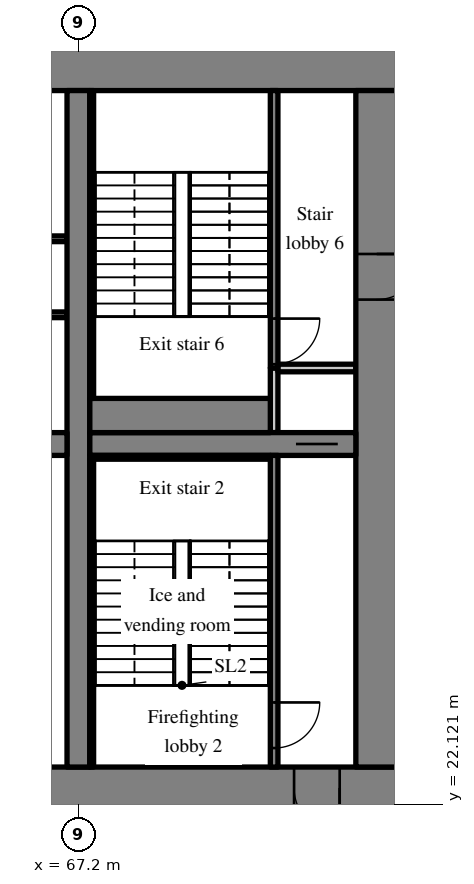
"""IFC4 building model, lengths in metres.
Left out: names, types, materials, properties, quantities, classifications, styles, units other than length and angle.
Written with IfcOpenShell. Run it as: python <this file> out.ifc"""

import sys

from ifc_helpers import new_model, si_unit, direction, frame, frame_2d, origin, place, context, subcontext, project, spatial, rectangle, extrude, source, transform, mapped, element, fill, save


model = new_model("IFC4")
c1 = context("Model", 3, precision=1e-05, world=origin(), true_north=direction((0.0, 1.0)))
c2 = subcontext(c1, "Body", "Model", "MODEL_VIEW")
j1 = project(units=[si_unit("LENGTHUNIT", "METRE"), si_unit("PLANEANGLEUNIT", "RADIAN")], contexts=[c1])
p1 = place(None, origin())
s1 = spatial("IfcSite", under=j1, at=p1, CompositionType="ELEMENT")
p2 = place(p1, origin())
s2 = spatial("IfcBuilding", under=s1, at=p2, CompositionType="ELEMENT")
p3 = place(p2, frame((0.0, 0.0, 18.0)))
s3 = spatial("IfcBuildingStorey", under=s2, at=p3, CompositionType="ELEMENT", Elevation=18.0)
m1 = source(origin(), c2, "Body", "SweptSolid", [
    extrude(rectangle(XDim=50.4, YDim=1.1, at=frame_2d((25.2, 0.0))), origin(), (0.0, 0.0, 1.0), 4.72),
])
p4 = place(p3, frame((25.2, 22.55, 0.0), z_axis=(0.0, 0.0, 1.0), x_axis=(1.0, 0.0, 0.0)))
e1 = element("IfcWall", 1, at=p4, inside=s3, PredefinedType="SHEAR", context=c2, shape_type="MappedRepresentation", body=[
    mapped(m1, transform((0.0, 0.0, 0.0), scale=1.0)),
])
m2 = source(origin(), c2, "Body", "SweptSolid", [
    extrude(rectangle(XDim=1.8, YDim=2.1, at=frame_2d((0.9, 1.05))), frame((0.0, 0.56, 0.0), z_axis=(0.0, -1.0, 0.0), x_axis=(1.0, 0.0, 0.0)), (0.0, 0.0, 1.0), 1.12),
])
p5 = place(p4, frame((15.9, 0.0, 0.0)))
e2 = element("IfcOpeningElement", 2, at=p5, cuts=e1, PredefinedType="OPENING", context=c2, shape_type="MappedRepresentation", body=[
    mapped(m2, transform((0.0, 0.0, 0.0), scale=1.0)),
])
m3 = source(origin(), c2, "Body", "SweptSolid", [
    extrude(rectangle(XDim=1.2, YDim=2.1, at=frame_2d((0.6, 1.05))), frame((0.0, 0.56, 0.0), z_axis=(0.0, -1.0, 0.0), x_axis=(1.0, 0.0, 0.0)), (0.0, 0.0, 1.0), 1.12),
])
p6 = place(p4, frame((27.0, 0.0, 0.0)))
e3 = element("IfcOpeningElement", 3, at=p6, cuts=e1, PredefinedType="OPENING", context=c2, shape_type="MappedRepresentation", body=[
    mapped(m3, transform((0.0, 0.0, 0.0), scale=1.0)),
])
m4 = source(origin(), c2, "Body", "SweptSolid", [
    extrude(rectangle(XDim=0.9, YDim=2.1, at=frame_2d((0.45, 1.05))), frame((0.0, 0.56, 0.0), z_axis=(0.0, -1.0, 0.0), x_axis=(1.0, 0.0, 0.0)), (0.0, 0.0, 1.0), 1.12),
])
p7 = place(p4, frame((34.5, 0.0, 0.0)))
e4 = element("IfcOpeningElement", 4, at=p7, cuts=e1, PredefinedType="OPENING", context=c2, shape_type="MappedRepresentation", body=[
    mapped(m4, transform((0.0, 0.0, 0.0), scale=1.0)),
])
p8 = place(p4, frame((31.5, 0.0, 0.0)))
e5 = element("IfcOpeningElement", 5, at=p8, cuts=e1, PredefinedType="OPENING", context=c2, shape_type="MappedRepresentation", body=[
    mapped(m4, transform((0.0, 0.0, 0.0), scale=1.0)),
])
p9 = place(p4, frame((39.75, 0.0, 0.0)))
e6 = element("IfcOpeningElement", 6, at=p9, cuts=e1, PredefinedType="OPENING", context=c2, shape_type="MappedRepresentation", body=[
    mapped(m4, transform((0.0, 0.0, 0.0), scale=1.0)),
])
p10 = place(p4, frame((36.75, 0.0, 0.0)))
e7 = element("IfcOpeningElement", 7, at=p10, cuts=e1, PredefinedType="OPENING", context=c2, shape_type="MappedRepresentation", body=[
    mapped(m4, transform((0.0, 0.0, 0.0), scale=1.0)),
])
p11 = place(p4, frame((6.425, 0.0, 0.0)))
e8 = element("IfcOpeningElement", 8, at=p11, cuts=e1, PredefinedType="OPENING", context=c2, shape_type="MappedRepresentation", body=[
    mapped(m3, transform((0.0, 0.0, 0.0), scale=1.0)),
])
p12 = place(p4, frame((47.675, 0.0, 0.0)))
e9 = element("IfcOpeningElement", 9, at=p12, cuts=e1, PredefinedType="OPENING", context=c2, shape_type="MappedRepresentation", body=[
    mapped(m3, transform((0.0, 0.0, 0.0), scale=1.0)),
])
p13 = place(p3, frame((25.2, 41.45, 0.0), z_axis=(0.0, 0.0, 1.0), x_axis=(1.0, 0.0, 0.0)))
e10 = element("IfcWall", 10, at=p13, inside=s3, PredefinedType="SHEAR", context=c2, shape_type="MappedRepresentation", body=[
    mapped(m1, transform((0.0, 0.0, 0.0), scale=1.0)),
])
m5 = source(origin(), c2, "Body", "SweptSolid", [
    extrude(rectangle(XDim=17.8, YDim=1.1, at=frame_2d((8.9, 0.0))), origin(), (0.0, 0.0, 1.0), 4.72),
])
p14 = place(p3, frame((75.05, 23.1, 0.0), z_axis=(0.0, 0.0, 1.0), x_axis=(0.0, 1.0, 0.0)))
e11 = element("IfcWall", 11, at=p14, inside=s3, PredefinedType="SHEAR", context=c2, shape_type="MappedRepresentation", body=[
    mapped(m5, transform((0.0, 0.0, 0.0), scale=1.0)),
])
p15 = place(p14, frame((12.3, 0.0, 0.0)))
e12 = element("IfcOpeningElement", 12, at=p15, cuts=e11, PredefinedType="OPENING", context=c2, shape_type="MappedRepresentation", body=[
    mapped(m3, transform((0.0, 0.0, 0.0), scale=1.0)),
])
m6 = source(origin(), c2, "Body", "SweptSolid", [
    extrude(rectangle(XDim=17.8, YDim=0.6, at=frame_2d((8.9, 0.0))), origin(), (0.0, 0.0, 1.0), 4.72),
])
p16 = place(p3, frame((67.2, 23.1, 0.0), z_axis=(0.0, 0.0, 1.0), x_axis=(0.0, 1.0, 0.0)))
e13 = element("IfcWall", 13, at=p16, inside=s3, PredefinedType="SHEAR", context=c2, shape_type="MappedRepresentation", body=[
    mapped(m6, transform((0.0, 0.0, 0.0), scale=1.0)),
])
m7 = source(origin(), c2, "Body", "SweptSolid", [
    extrude(rectangle(XDim=16.2, YDim=0.6, at=frame_2d((8.1, 0.0))), origin(), (0.0, 0.0, 1.0), 4.72),
])
p17 = place(p3, frame((50.7, 31.6, 0.0), z_axis=(0.0, 0.0, 1.0), x_axis=(1.0, 0.0, 0.0)))
e14 = element("IfcWall", 14, at=p17, inside=s3, PredefinedType="SHEAR", context=c2, shape_type="MappedRepresentation", body=[
    mapped(m7, transform((0.0, 0.0, 0.0), scale=1.0)),
])
m8 = source(origin(), c2, "Body", "SweptSolid", [
    extrude(rectangle(XDim=1.0, YDim=2.1, at=frame_2d((0.5, 1.05))), frame((0.0, 0.31, 0.0), z_axis=(0.0, -1.0, 0.0), x_axis=(1.0, 0.0, 0.0)), (0.0, 0.0, 1.0), 0.62),
])
p18 = place(p17, frame((0.55, 0.0, 0.0)))
e15 = element("IfcOpeningElement", 15, at=p18, cuts=e14, PredefinedType="OPENING", context=c2, shape_type="MappedRepresentation", body=[
    mapped(m8, transform((0.0, 0.0, 0.0), scale=1.0)),
])
m9 = source(origin(), c2, "Body", "SweptSolid", [
    extrude(rectangle(XDim=7.0, YDim=0.6, at=frame_2d((3.5, 0.0))), origin(), (0.0, 0.0, 1.0), 4.72),
])
p19 = place(p3, frame((67.5, 31.6, 0.0), z_axis=(0.0, 0.0, 1.0), x_axis=(1.0, 0.0, 0.0)))
e16 = element("IfcWall", 16, at=p19, inside=s3, PredefinedType="SHEAR", context=c2, shape_type="MappedRepresentation", body=[
    mapped(m9, transform((0.0, 0.0, 0.0), scale=1.0)),
])
m10 = source(origin(), c2, "Body", "SweptSolid", [
    extrude(rectangle(XDim=1.1, YDim=2.1, at=frame_2d((0.55, 1.05))), frame((0.0, 0.31, 0.0), z_axis=(0.0, -1.0, 0.0), x_axis=(1.0, 0.0, 0.0)), (0.0, 0.0, 1.0), 0.62),
])
p20 = place(p19, frame((5.425, 0.0, 0.0)))
e17 = element("IfcOpeningElement", 17, at=p20, cuts=e16, PredefinedType="OPENING", context=c2, shape_type="MappedRepresentation", body=[
    mapped(m10, transform((0.0, 0.0, 0.0), scale=1.0)),
])
m11 = source(origin(), c2, "Body", "SweptSolid", [
    extrude(rectangle(XDim=14.1, YDim=0.15, at=frame_2d((7.05, 0.0))), origin(), (0.0, 0.0, 1.0), 4.72),
])
p21 = place(p3, frame((66.9, 35.0, 0.0), z_axis=(0.0, 0.0, 1.0), x_axis=(-1.0, 0.0, 0.0)))
e18 = element("IfcWall", 18, at=p21, inside=s3, PredefinedType="PARTITIONING", context=c2, shape_type="MappedRepresentation", body=[
    mapped(m11, transform((0.0, 0.0, 0.0), scale=1.0)),
])
m12 = source(origin(), c2, "Body", "SweptSolid", [
    extrude(rectangle(XDim=0.9, YDim=2.1, at=frame_2d((0.45, 1.05))), frame((0.0, 0.085, 0.0), z_axis=(0.0, -1.0, 0.0), x_axis=(1.0, 0.0, 0.0)), (0.0, 0.0, 1.0), 0.17),
])
p22 = place(p21, frame((0.952, 0.0, 0.0)))
e19 = element("IfcOpeningElement", 19, at=p22, cuts=e18, PredefinedType="OPENING", context=c2, shape_type="MappedRepresentation", body=[
    mapped(m12, transform((0.0, 0.0, 0.0), scale=1.0)),
])
p23 = place(p21, frame((5.861, 0.0, 0.0)))
e20 = element("IfcOpeningElement", 20, at=p23, cuts=e18, PredefinedType="OPENING", context=c2, shape_type="MappedRepresentation", body=[
    mapped(m12, transform((0.0, 0.0, 0.0), scale=1.0)),
])
p24 = place(p21, frame((11.471, 0.0, 0.0)))
e21 = element("IfcOpeningElement", 21, at=p24, cuts=e18, PredefinedType="OPENING", context=c2, shape_type="MappedRepresentation", body=[
    mapped(m12, transform((0.0, 0.0, 0.0), scale=1.0)),
])
m13 = source(origin(), c2, "Body", "SweptSolid", [
    extrude(rectangle(XDim=16.2, YDim=0.15, at=frame_2d((8.1, 0.0))), origin(), (0.0, 0.0, 1.0), 4.72),
])
p25 = place(p3, frame((66.9, 37.0, 0.0), z_axis=(0.0, 0.0, 1.0), x_axis=(-1.0, 0.0, 0.0)))
e22 = element("IfcWall", 22, at=p25, inside=s3, PredefinedType="PARTITIONING", context=c2, shape_type="MappedRepresentation", body=[
    mapped(m13, transform((0.0, 0.0, 0.0), scale=1.0)),
])
p26 = place(p25, frame((0.765, 0.0, 0.0)))
e23 = element("IfcOpeningElement", 23, at=p26, cuts=e22, PredefinedType="OPENING", context=c2, shape_type="MappedRepresentation", body=[
    mapped(m12, transform((0.0, 0.0, 0.0), scale=1.0)),
])
p27 = place(p25, frame((3.6, 0.0, 0.0)))
e24 = element("IfcOpeningElement", 24, at=p27, cuts=e22, PredefinedType="OPENING", context=c2, shape_type="MappedRepresentation", body=[
    mapped(m12, transform((0.0, 0.0, 0.0), scale=1.0)),
])
p28 = place(p25, frame((9.27, 0.0, 0.0)))
e25 = element("IfcOpeningElement", 25, at=p28, cuts=e22, PredefinedType="OPENING", context=c2, shape_type="MappedRepresentation", body=[
    mapped(m12, transform((0.0, 0.0, 0.0), scale=1.0)),
])
p29 = place(p25, frame((14.535, 0.0, 0.0)))
e26 = element("IfcOpeningElement", 26, at=p29, cuts=e22, PredefinedType="OPENING", context=c2, shape_type="MappedRepresentation", body=[
    mapped(m12, transform((0.0, 0.0, 0.0), scale=1.0)),
])
m14 = source(origin(), c2, "Body", "SweptSolid", [
    extrude(rectangle(XDim=8.2, YDim=0.2, at=frame_2d((4.1, 0.0))), origin(), (0.0, 0.0, 1.0), 4.72),
])
p30 = place(p3, frame((72.35, 23.1, 0.0), z_axis=(0.0, 0.0, 1.0), x_axis=(0.0, 1.0, 0.0)))
e27 = element("IfcWall", 27, at=p30, inside=s3, PredefinedType="SOLIDWALL", context=c2, shape_type="MappedRepresentation", body=[
    mapped(m14, transform((0.0, 0.0, 0.0), scale=1.0)),
])
m15 = source(origin(), c2, "Body", "SweptSolid", [
    extrude(rectangle(XDim=1.2, YDim=2.1, at=frame_2d((0.6, 1.05))), frame((0.0, 0.11, 0.0), z_axis=(0.0, -1.0, 0.0), x_axis=(1.0, 0.0, 0.0)), (0.0, 0.0, 1.0), 0.22),
])
p31 = place(p30, frame((0.5, 0.0, 0.0)))
e28 = element("IfcOpeningElement", 28, at=p31, cuts=e27, PredefinedType="OPENING", context=c2, shape_type="MappedRepresentation", body=[
    mapped(m15, transform((0.0, 0.0, 0.0), scale=1.0)),
])
m16 = source(origin(), c2, "Body", "SweptSolid", [
    extrude(rectangle(XDim=1.7, YDim=0.2, at=frame_2d((0.85, 0.0))), origin(), (0.0, 0.0, 1.0), 4.72),
])
p32 = place(p3, frame((72.35, 31.9, 0.0), z_axis=(0.0, 0.0, 1.0), x_axis=(0.0, 1.0, 0.0)))
e29 = element("IfcWall", 29, at=p32, inside=s3, PredefinedType="SOLIDWALL", context=c2, shape_type="MappedRepresentation", body=[
    mapped(m16, transform((0.0, 0.0, 0.0), scale=1.0)),
])
m17 = source(origin(), c2, "Body", "SweptSolid", [
    extrude(rectangle(XDim=2.05, YDim=0.2, at=frame_2d((1.025, 0.0))), origin(), (0.0, 0.0, 1.0), 4.72),
])
p33 = place(p3, frame((72.45, 33.6, 0.0), z_axis=(0.0, 0.0, 1.0), x_axis=(1.0, 0.0, 0.0)))
e30 = element("IfcWall", 30, at=p33, inside=s3, PredefinedType="SOLIDWALL", context=c2, shape_type="MappedRepresentation", body=[
    mapped(m17, transform((0.0, 0.0, 0.0), scale=1.0)),
])
m18 = source(origin(), c2, "Body", "SweptSolid", [
    extrude(rectangle(XDim=7.3, YDim=0.2, at=frame_2d((3.65, 0.0))), origin(), (0.0, 0.0, 1.0), 4.72),
])
p34 = place(p3, frame((72.35, 33.6, 0.0), z_axis=(0.0, 0.0, 1.0), x_axis=(0.0, 1.0, 0.0)))
e31 = element("IfcWall", 31, at=p34, inside=s3, PredefinedType="SOLIDWALL", context=c2, shape_type="MappedRepresentation", body=[
    mapped(m18, transform((0.0, 0.0, 0.0), scale=1.0)),
])
p35 = place(p34, frame((0.1, 0.0, 0.0)))
e32 = element("IfcOpeningElement", 32, at=p35, cuts=e31, PredefinedType="OPENING", context=c2, shape_type="MappedRepresentation", body=[
    mapped(m15, transform((0.0, 0.0, 0.0), scale=1.0)),
])
m19 = source(origin(), c2, "Body", "SweptSolid", [
    extrude(rectangle(XDim=4.75, YDim=0.1, at=frame_2d((2.375, 0.0))), origin(), (0.0, 0.0, 1.0), 4.72),
])
p36 = place(p3, frame((67.5, 31.25, 0.0), z_axis=(0.0, 0.0, 1.0), x_axis=(1.0, 0.0, 0.0)))
e33 = element("IfcWall", 33, at=p36, inside=s3, PredefinedType="SOLIDWALL", context=c2, shape_type="MappedRepresentation", body=[
    mapped(m19, transform((0.0, 0.0, 0.0), scale=1.0)),
])
m20 = source(origin(), c2, "Body", "SweptSolid", [
    extrude(rectangle(XDim=8.1, YDim=0.1, at=frame_2d((4.05, 0.0))), origin(), (0.0, 0.0, 1.0), 4.72),
])
p37 = place(p3, frame((67.55, 23.1, 0.0), z_axis=(0.0, 0.0, 1.0), x_axis=(0.0, 1.0, 0.0)))
e34 = element("IfcWall", 34, at=p37, inside=s3, PredefinedType="SOLIDWALL", context=c2, shape_type="MappedRepresentation", body=[
    mapped(m20, transform((0.0, 0.0, 0.0), scale=1.0)),
])
m21 = source(origin(), c2, "Body", "SweptSolid", [
    extrude(rectangle(XDim=4.75, YDim=0.9, at=frame_2d((2.375, 0.0))), origin(), (0.0, 0.0, 1.0), 4.72),
])
p38 = place(p3, frame((67.5, 32.35, 0.0), z_axis=(0.0, 0.0, 1.0), x_axis=(1.0, 0.0, 0.0)))
e35 = element("IfcWall", 35, at=p38, inside=s3, PredefinedType="SOLIDWALL", context=c2, shape_type="MappedRepresentation", body=[
    mapped(m21, transform((0.0, 0.0, 0.0), scale=1.0)),
])
p39 = place(p3, frame((67.55, 32.8, 0.0), z_axis=(0.0, 0.0, 1.0), x_axis=(0.0, 1.0, 0.0)))
e36 = element("IfcWall", 36, at=p39, inside=s3, PredefinedType="SOLIDWALL", context=c2, shape_type="MappedRepresentation", body=[
    mapped(m20, transform((0.0, 0.0, 0.0), scale=1.0)),
])
m22 = source(origin(), c2, "Body", "SweptSolid", [
    extrude(rectangle(XDim=1.2, YDim=2.1, at=frame_2d((0.6, 1.05))), frame((0.0, 0.025, 0.0), z_axis=(0.0, -1.0, 0.0), x_axis=(1.0, 0.0, 0.0)), (0.0, 0.0, 1.0), 0.05),
])
p40 = place(p31, origin())
e37 = element("IfcDoor", 37, at=p40, inside=s3, OperationType="SINGLE_SWING_RIGHT", PredefinedType="DOOR", context=c2, shape_type="MappedRepresentation", body=[
    mapped(m22, transform((0.0, 0.0, 0.0), scale=1.0)),
])
fill(e28, e37)
m23 = source(origin(), c2, "Body", "SweptSolid", [
    extrude(rectangle(XDim=1.2, YDim=2.1, at=frame_2d((0.6, 1.05))), frame((0.0, 0.325, 0.0), z_axis=(0.0, -1.0, 0.0), x_axis=(1.0, 0.0, 0.0)), (0.0, 0.0, 1.0), 0.05),
])
p41 = place(p12, origin())
e38 = element("IfcDoor", 38, at=p41, inside=s3, OperationType="SINGLE_SWING_RIGHT", PredefinedType="DOOR", context=c2, shape_type="MappedRepresentation", body=[
    mapped(m23, transform((0.0, 0.0, 0.0), scale=1.0)),
])
fill(e9, e38)
m24 = source(origin(), c2, "Body", "SweptSolid", [
    extrude(rectangle(XDim=1.1, YDim=2.1, at=frame_2d((0.55, 1.05))), frame((0.0, 0.025, 0.0), z_axis=(0.0, -1.0, 0.0), x_axis=(1.0, 0.0, 0.0)), (0.0, 0.0, 1.0), 0.05),
])
p42 = place(p20, origin())
e39 = element("IfcDoor", 39, at=p42, inside=s3, OperationType="SLIDING_TO_RIGHT", PredefinedType="DOOR", context=c2, shape_type="MappedRepresentation", body=[
    mapped(m24, transform((0.0, 0.0, 0.0), scale=1.0)),
])
fill(e17, e39)
p43 = place(p35, origin())
e40 = element("IfcDoor", 40, at=p43, inside=s3, OperationType="SINGLE_SWING_RIGHT", PredefinedType="DOOR", context=c2, shape_type="MappedRepresentation", body=[
    mapped(m22, transform((0.0, 0.0, 0.0), scale=1.0)),
])
fill(e32, e40)
p44 = place(p15, origin())
e41 = element("IfcDoor", 41, at=p44, inside=s3, OperationType="SINGLE_SWING_RIGHT", PredefinedType="DOOR", context=c2, shape_type="MappedRepresentation", body=[
    mapped(m22, transform((0.0, 0.0, 0.0), scale=1.0)),
])
fill(e12, e41)
save(model, sys.argv[1])
